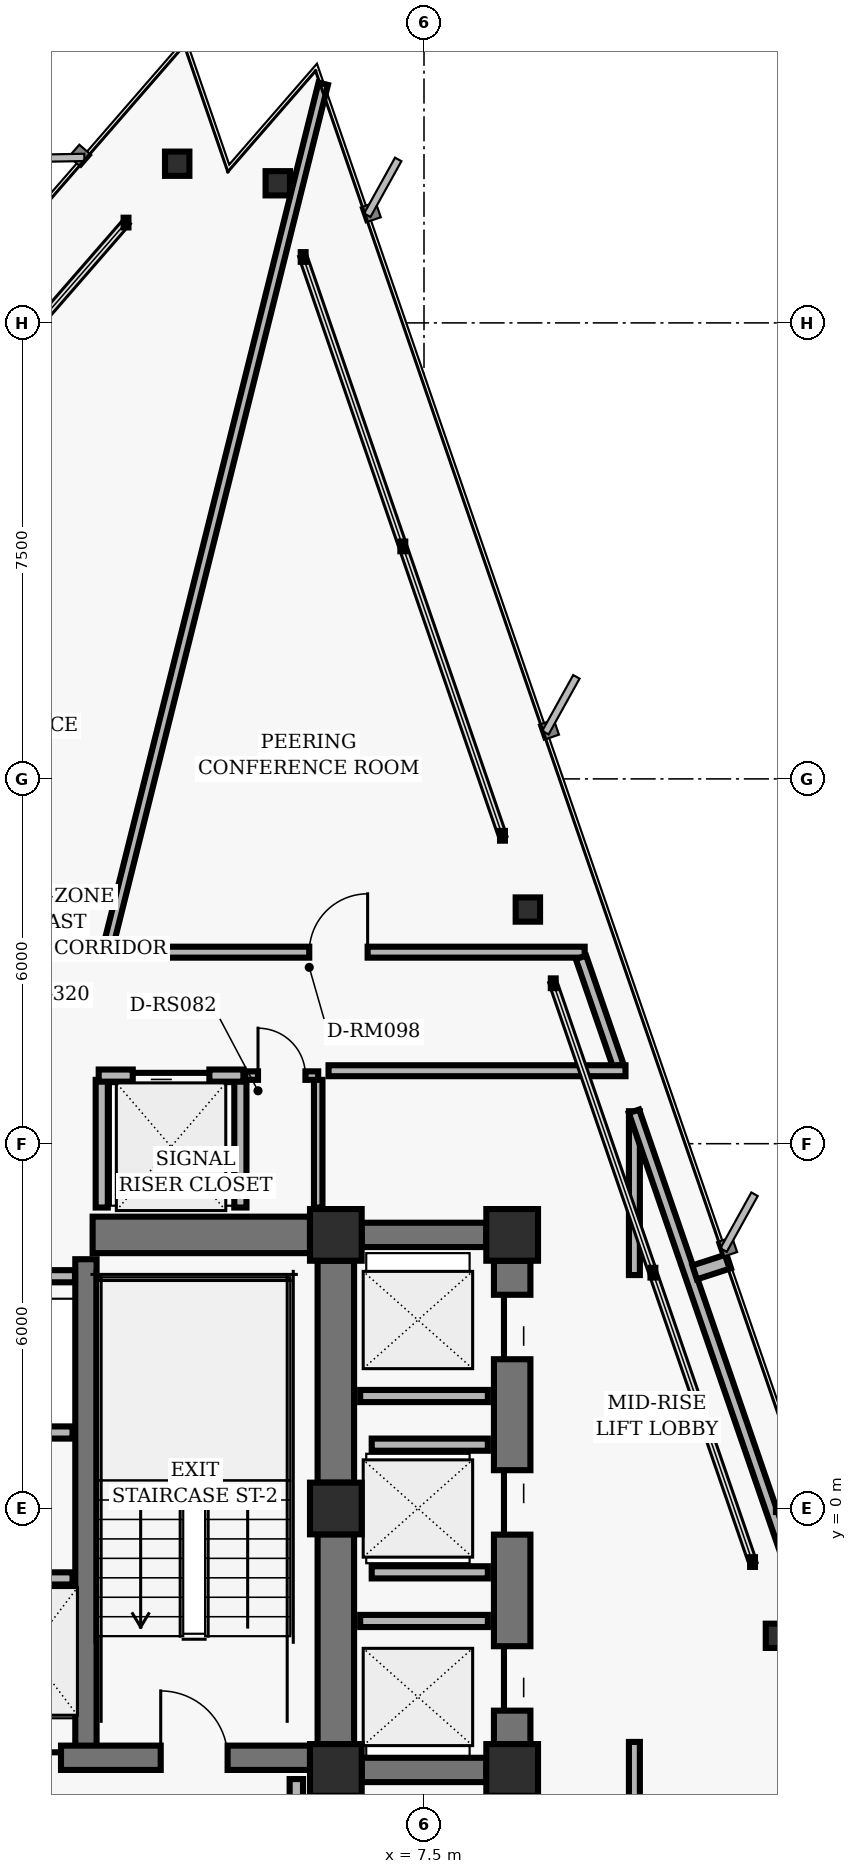
"""IFC4 building model, lengths in metres.
Left out: names, types, materials, properties, quantities, classifications, styles, units other than length and angle.
Written with IfcOpenShell. Run it as: python <this file> out.ifc"""

import sys

from ifc_helpers import new_model, si_unit, direction, frame, frame_2d, origin, origin_2d, place, context, subcontext, project, spatial, rectangle, hollow_rectangle, i_section, extrude, element, fill, save


model = new_model("IFC4")
c1 = context("Model", 3, precision=1e-05, world=origin(), true_north=direction((0.0, 1.0)))
c2 = subcontext(c1, "Body", "Model", "MODEL_VIEW")
j1 = project(units=[si_unit("LENGTHUNIT", "METRE"), si_unit("PLANEANGLEUNIT", "RADIAN")], contexts=[c1])
p1 = place(None, origin())
s1 = spatial("IfcSite", under=j1, at=p1, CompositionType="ELEMENT")
p2 = place(p1, origin())
s2 = spatial("IfcBuilding", under=s1, at=p2, CompositionType="ELEMENT")
p3 = place(p2, frame((0.0, 0.0, 147.2)))
s3 = spatial("IfcBuildingStorey", under=s2, at=p3, CompositionType="ELEMENT", Elevation=147.2)
for number, where, z_axis, x_axis in (
    (1, (6.05, 4.5, 0.0), (0.0, 0.0, 1.0), (1.0, 0.0, 0.0)),
    (2, (6.05, 0.0, 0.0), (0.0, 0.0, 1.0), (1.0, 0.0, 0.0)),
    (3, (6.05, -4.3, 0.0), (0.0, 0.0, 1.0), (1.0, 0.0, 0.0)),
    (4, (8.95, 4.5, 0.0), (0.0, 0.0, 1.0), (1.0, 0.0, 0.0)),
    (5, (8.95, -4.3, 0.0), (0.0, 0.0, 1.0), (1.0, 0.0, 0.0)),
):
    element("IfcColumn", number, at=place(p3, frame(where, z_axis=z_axis, x_axis=x_axis)), inside=s3, PredefinedType="COLUMN", context=c2, shape_type="SweptSolid", body=[
        extrude(hollow_rectangle(XDim=0.85, YDim=0.85, WallThickness=0.055, InnerFilletRadius=0.02, OuterFilletRadius=0.04, at=origin_2d()), origin(), (0.0, 0.0, 1.0), 3.04),
    ])
p4 = place(p3, frame((6.05, 0.425, 0.0), z_axis=(0.0, 0.0, 1.0), x_axis=(0.0, 1.0, 0.0)))
e6 = element("IfcWall", 6, at=p4, inside=s3, PredefinedType="SHEAR", context=c2, shape_type="SweptSolid", body=[
    extrude(rectangle(XDim=3.65, YDim=0.6, at=frame_2d((1.825, 0.0))), origin(), (0.0, 0.0, 1.0), 2.788),
])
p5 = place(p3, frame((6.05, -3.875, 0.0), z_axis=(0.0, 0.0, 1.0), x_axis=(0.0, 1.0, 0.0)))
e7 = element("IfcWall", 7, at=p5, inside=s3, PredefinedType="SHEAR", context=c2, shape_type="SweptSolid", body=[
    extrude(rectangle(XDim=3.45, YDim=0.6, at=frame_2d((1.725, 0.0))), origin(), (0.0, 0.0, 1.0), 2.788),
])
p6 = place(p3, frame((1.94, -4.1, 0.0), z_axis=(0.0, 0.0, 1.0), x_axis=(0.0, 1.0, 0.0)))
e8 = element("IfcWall", 8, at=p6, inside=s3, PredefinedType="SHEAR", context=c2, shape_type="SweptSolid", body=[
    extrude(rectangle(XDim=8.2, YDim=0.35, at=frame_2d((4.1, 0.0))), origin(), (0.0, 0.0, 1.0), 2.788),
])
p7 = place(p3, frame((-5.625, -4.1, 0.0), z_axis=(0.0, 0.0, 1.0), x_axis=(1.0, 0.0, 0.0)))
e9 = element("IfcWall", 9, at=p7, inside=s3, PredefinedType="SHEAR", context=c2, shape_type="SweptSolid", body=[
    extrude(rectangle(XDim=11.25, YDim=0.4, at=frame_2d((5.625, 0.0))), origin(), (0.0, 0.0, 1.0), 2.788),
])
p8 = place(p7, frame((1.355, 0.0, 0.0)))
e10 = element("IfcOpeningElement", 10, at=p8, cuts=e9, PredefinedType="OPENING", context=c2, shape_type="SweptSolid", body=[
    extrude(rectangle(XDim=1.1, YDim=2.04, at=frame_2d((0.55, 1.02))), frame((0.0, 0.21, 0.0), z_axis=(0.0, -1.0, 0.0), x_axis=(1.0, 0.0, 0.0)), (0.0, 0.0, 1.0), 0.42),
])
p9 = place(p7, frame((8.795, 0.0, 0.0)))
e11 = element("IfcOpeningElement", 11, at=p9, cuts=e9, PredefinedType="OPENING", context=c2, shape_type="SweptSolid", body=[
    extrude(rectangle(XDim=1.1, YDim=2.04, at=frame_2d((0.55, 1.02))), frame((0.0, 0.21, 0.0), z_axis=(0.0, -1.0, 0.0), x_axis=(1.0, 0.0, 0.0)), (0.0, 0.0, 1.0), 0.42),
])
p10 = place(p7, frame((4.095, 0.0, 0.0)))
e12 = element("IfcOpeningElement", 12, at=p10, cuts=e9, PredefinedType="OPENING", context=c2, shape_type="SweptSolid", body=[
    extrude(rectangle(XDim=1.06, YDim=2.04, at=frame_2d((0.53, 1.02))), frame((0.0, 0.21, 0.0), z_axis=(0.0, -1.0, 0.0), x_axis=(1.0, 0.0, 0.0)), (0.0, 0.0, 1.0), 0.42),
])
p11 = place(p7, frame((6.095, 0.0, 0.0)))
e13 = element("IfcOpeningElement", 13, at=p11, cuts=e9, PredefinedType="OPENING", context=c2, shape_type="SweptSolid", body=[
    extrude(rectangle(XDim=1.06, YDim=2.04, at=frame_2d((0.53, 1.02))), frame((0.0, 0.21, 0.0), z_axis=(0.0, -1.0, 0.0), x_axis=(1.0, 0.0, 0.0)), (0.0, 0.0, 1.0), 0.42),
])
p12 = place(p3, frame((2.05, 4.5, 0.0), z_axis=(0.0, 0.0, 1.0), x_axis=(1.0, 0.0, 0.0)))
e14 = element("IfcWall", 14, at=p12, inside=s3, PredefinedType="SHEAR", context=c2, shape_type="SweptSolid", body=[
    extrude(rectangle(XDim=3.575, YDim=0.6, at=frame_2d((1.788, 0.0))), origin(), (0.0, 0.0, 1.0), 2.788),
])
p13 = place(p3, frame((8.95, -3.875, 0.0), z_axis=(0.0, 0.0, 1.0), x_axis=(0.0, 1.0, 0.0)))
e15 = element("IfcWall", 15, at=p13, inside=s3, PredefinedType="SHEAR", context=c2, shape_type="SweptSolid", body=[
    extrude(rectangle(XDim=7.95, YDim=0.6, at=frame_2d((3.975, 0.0))), origin(), (0.0, 0.0, 1.0), 2.788),
])
p14 = place(p13, frame((0.55, 0.0, 0.0)))
e16 = element("IfcOpeningElement", 16, at=p14, cuts=e15, PredefinedType="OPENING", context=c2, shape_type="SweptSolid", body=[
    extrude(rectangle(XDim=1.06, YDim=2.04, at=frame_2d((0.53, 1.02))), frame((0.0, 0.31, 0.0), z_axis=(0.0, -1.0, 0.0), x_axis=(1.0, 0.0, 0.0)), (0.0, 0.0, 1.0), 0.62),
])
p15 = place(p13, frame((3.445, 0.0, 0.0)))
e17 = element("IfcOpeningElement", 17, at=p15, cuts=e15, PredefinedType="OPENING", context=c2, shape_type="SweptSolid", body=[
    extrude(rectangle(XDim=1.06, YDim=2.04, at=frame_2d((0.53, 1.02))), frame((0.0, 0.31, 0.0), z_axis=(0.0, -1.0, 0.0), x_axis=(1.0, 0.0, 0.0)), (0.0, 0.0, 1.0), 0.62),
])
p16 = place(p13, frame((6.33, 0.0, 0.0)))
e18 = element("IfcOpeningElement", 18, at=p16, cuts=e15, PredefinedType="OPENING", context=c2, shape_type="SweptSolid", body=[
    extrude(rectangle(XDim=1.06, YDim=2.04, at=frame_2d((0.53, 1.02))), frame((0.0, 0.31, 0.0), z_axis=(0.0, -1.0, 0.0), x_axis=(1.0, 0.0, 0.0)), (0.0, 0.0, 1.0), 0.62),
])
for number, where, z_axis, x_axis in (
    (19, (6.475, 4.5, 0.0), (0.0, 0.0, 1.0), (1.0, 0.0, 0.0)),
    (20, (6.475, -4.3, 0.0), (0.0, 0.0, 1.0), (1.0, 0.0, 0.0)),
):
    element("IfcWall", number, at=place(p3, frame(where, z_axis=z_axis, x_axis=x_axis)), inside=s3, PredefinedType="SHEAR", context=c2, shape_type="SweptSolid", body=[
        extrude(rectangle(XDim=2.05, YDim=0.4, at=frame_2d((1.025, 0.0))), origin(), (0.0, 0.0, 1.0), 2.788),
    ])
for number, where, z_axis, x_axis in (
    (21, (13.321, -2.094, 0.0), (0.0, 0.0, 1.0), (1.0, 0.0, 0.0)),
    (22, (9.208, 9.851, 0.0), (0.0, 0.0, 1.0), (1.0, 0.0, 0.0)),
    (23, (5.095, 21.796, 0.0), (0.0, 0.0, 1.0), (1.0, 0.0, 0.0)),
    (24, (3.441, 22.118, 0.0), (0.0, 0.0, 1.0), (1.0, 0.0, 0.0)),
):
    element("IfcColumn", number, at=place(p3, frame(where, z_axis=z_axis, x_axis=x_axis)), inside=s3, PredefinedType="COLUMN", context=c2, shape_type="SweptSolid", body=[
        extrude(i_section(OverallWidth=0.401, OverallDepth=0.399, WebThickness=0.025, FlangeThickness=0.04, FilletRadius=0.018, at=origin_2d()), origin(), (0.0, 0.0, 1.0), 3.04),
    ])
p17 = place(p3, frame((-1.72, -1.15, 0.0), z_axis=(0.0, 0.0, 1.0), x_axis=(1.0, 0.0, 0.0)))
e25 = element("IfcWall", 25, at=p17, inside=s3, PredefinedType="PARTITIONING", context=c2, shape_type="SweptSolid", body=[
    extrude(rectangle(XDim=3.44, YDim=0.2, at=frame_2d((1.72, 0.0))), origin(), (0.0, 0.0, 1.0), 2.763),
])
p18 = place(p3, frame((5.4, -7.16, 0.0), z_axis=(0.0, 0.0, 1.0), x_axis=(0.0, 1.0, 0.0)))
e26 = element("IfcWall", 26, at=p18, inside=s3, PredefinedType="PARTITIONING", context=c2, shape_type="SweptSolid", body=[
    extrude(rectangle(XDim=2.71, YDim=0.22, at=frame_2d((1.355, 0.0))), origin(), (0.0, 0.0, 1.0), 2.763),
])
p19 = place(p3, frame((-1.72, 1.25, 0.0), z_axis=(0.0, 0.0, 1.0), x_axis=(1.0, 0.0, 0.0)))
e27 = element("IfcWall", 27, at=p19, inside=s3, PredefinedType="PARTITIONING", context=c2, shape_type="SweptSolid", body=[
    extrude(rectangle(XDim=3.44, YDim=0.2, at=frame_2d((1.72, 0.0))), origin(), (0.0, 0.0, 1.0), 2.763),
])
p20 = place(p3, frame((-1.76, 3.82, 0.0), z_axis=(0.0, 0.0, 1.0), x_axis=(1.0, 0.0, 0.0)))
e28 = element("IfcWall", 28, at=p20, inside=s3, PredefinedType="PARTITIONING", context=c2, shape_type="SweptSolid", body=[
    extrude(rectangle(XDim=3.52, YDim=0.2, at=frame_2d((1.76, 0.0))), origin(), (0.0, 0.0, 1.0), 2.763),
])
for number, where, z_axis, x_axis in (
    (29, (2.2, 4.95, 0.0), (0.0, 0.0, 1.0), (0.0, 1.0, 0.0)),
    (30, (4.48, 4.95, 0.0), (0.0, 0.0, 1.0), (0.0, 1.0, 0.0)),
):
    element("IfcWall", number, at=place(p3, frame(where, z_axis=z_axis, x_axis=x_axis)), inside=s3, PredefinedType="PARTITIONING", context=c2, shape_type="SweptSolid", body=[
        extrude(rectangle(XDim=2.1, YDim=0.2, at=frame_2d((1.05, 0.0))), origin(), (0.0, 0.0, 1.0), 2.763),
    ])
p21 = place(p3, frame((2.15, 7.12, 0.0), z_axis=(0.0, 0.0, 1.0), x_axis=(1.0, 0.0, 0.0)))
e31 = element("IfcWall", 31, at=p21, inside=s3, PredefinedType="PARTITIONING", context=c2, shape_type="SweptSolid", body=[
    extrude(rectangle(XDim=2.38, YDim=0.2, at=frame_2d((1.19, 0.0))), origin(), (0.0, 0.0, 1.0), 2.763),
])
p22 = place(p21, frame((0.56, 0.0, 0.0)))
e32 = element("IfcOpeningElement", 32, at=p22, cuts=e31, PredefinedType="OPENING", context=c2, shape_type="SweptSolid", body=[
    extrude(rectangle(XDim=1.26, YDim=2.06, at=frame_2d((0.63, 1.03))), frame((0.0, 0.11, 0.0), z_axis=(0.0, -1.0, 0.0), x_axis=(1.0, 0.0, 0.0)), (0.0, 0.0, 1.0), 0.22),
])
p23 = place(p3, frame((5.76, 4.95, 0.0), z_axis=(0.0, 0.0, 1.0), x_axis=(0.0, 1.0, 0.0)))
e33 = element("IfcWall", 33, at=p23, inside=s3, PredefinedType="PARTITIONING", context=c2, shape_type="SweptSolid", body=[
    extrude(rectangle(XDim=2.1, YDim=0.14, at=frame_2d((1.05, 0.0))), origin(), (0.0, 0.0, 1.0), 2.763),
])
p24 = place(p3, frame((4.56, 7.12, 0.0), z_axis=(0.0, 0.0, 1.0), x_axis=(1.0, 0.0, 0.0)))
e34 = element("IfcWall", 34, at=p24, inside=s3, PredefinedType="PARTITIONING", context=c2, shape_type="SweptSolid", body=[
    extrude(rectangle(XDim=1.2, YDim=0.14, at=frame_2d((0.6, 0.0))), origin(), (0.0, 0.0, 1.0), 2.763),
])
p25 = place(p24, frame((0.21, 0.0, 0.0)))
e35 = element("IfcOpeningElement", 35, at=p25, cuts=e34, PredefinedType="OPENING", context=c2, shape_type="SweptSolid", body=[
    extrude(rectangle(XDim=0.78, YDim=2.01, at=frame_2d((0.39, 1.005))), frame((0.0, 0.08, 0.0), z_axis=(0.0, -1.0, 0.0), x_axis=(1.0, 0.0, 0.0)), (0.0, 0.0, 1.0), 0.16),
])
for number, where, z_axis, x_axis in (
    (36, (6.45, -1.85, 0.0), (0.0, 0.0, 1.0), (1.0, 0.0, 0.0)),
    (37, (6.45, 1.85, 0.0), (0.0, 0.0, 1.0), (1.0, 0.0, 0.0)),
):
    element("IfcWall", number, at=place(p3, frame(where, z_axis=z_axis, x_axis=x_axis)), inside=s3, PredefinedType="PARTITIONING", context=c2, shape_type="SweptSolid", body=[
        extrude(rectangle(XDim=2.1, YDim=0.2, at=frame_2d((1.05, 0.0))), origin(), (0.0, 0.0, 1.0), 2.763),
    ])
for number, where, z_axis, x_axis in (
    (38, (6.64, -1.05, 0.0), (0.0, 0.0, 1.0), (1.0, 0.0, 0.0)),
    (39, (6.64, 1.05, 0.0), (0.0, 0.0, 1.0), (1.0, 0.0, 0.0)),
):
    element("IfcWall", number, at=place(p3, frame(where, z_axis=z_axis, x_axis=x_axis)), inside=s3, PredefinedType="PARTITIONING", context=c2, shape_type="SweptSolid", body=[
        extrude(rectangle(XDim=1.91, YDim=0.2, at=frame_2d((0.955, 0.0))), origin(), (0.0, 0.0, 1.0), 2.763),
    ])
p26 = place(p3, frame((-6.52, 9.15, 0.0), z_axis=(0.0, 0.0, 1.0), x_axis=(1.0, 0.0, 0.0)))
e40 = element("IfcWall", 40, at=p26, inside=s3, PredefinedType="PARTITIONING", context=c2, shape_type="SweptSolid", body=[
    extrude(rectangle(XDim=16.662, YDim=0.18, at=frame_2d((8.331, 0.0))), origin(), (0.0, 0.0, 1.0), 2.763),
])
p27 = place(p26, frame((12.133, 0.0, 0.0)))
e41 = element("IfcOpeningElement", 41, at=p27, cuts=e40, PredefinedType="OPENING", context=c2, shape_type="SweptSolid", body=[
    extrude(rectangle(XDim=0.96, YDim=2.02, at=frame_2d((0.48, 1.01))), frame((0.0, 0.1, 0.0), z_axis=(0.0, -1.0, 0.0), x_axis=(1.0, 0.0, 0.0)), (0.0, 0.0, 1.0), 0.2),
])
p28 = place(p26, frame((4.06, 0.0, 0.0)))
e42 = element("IfcOpeningElement", 42, at=p28, cuts=e40, PredefinedType="OPENING", context=c2, shape_type="SweptSolid", body=[
    extrude(rectangle(XDim=0.96, YDim=2.02, at=frame_2d((0.48, 1.01))), frame((0.0, 0.1, 0.0), z_axis=(0.0, -1.0, 0.0), x_axis=(1.0, 0.0, 0.0)), (0.0, 0.0, 1.0), 0.2),
])
p29 = place(p3, frame((10.082, 9.065, 0.0), z_axis=(0.0, 0.0, 1.0), x_axis=(0.325550958337, -0.945524496524, 0.0)))
e43 = element("IfcWall", 43, at=p29, inside=s3, PredefinedType="PARTITIONING", context=c2, shape_type="SweptSolid", body=[
    extrude(rectangle(XDim=1.882, YDim=0.18, at=frame_2d((0.941, 0.0))), origin(), (0.0, 0.0, 1.0), 2.763),
])
p30 = place(p3, frame((10.814, 7.2, 0.0), z_axis=(0.0, 0.0, 1.0), x_axis=(-1.0, 0.0, 0.0)))
e44 = element("IfcWall", 44, at=p30, inside=s3, PredefinedType="PARTITIONING", context=c2, shape_type="SweptSolid", body=[
    extrude(rectangle(XDim=4.884, YDim=0.18, at=frame_2d((2.442, 0.0))), origin(), (0.0, 0.0, 1.0), 2.763),
])
p31 = place(p3, frame((10.96, -7.11, 0.0), z_axis=(0.0, 0.0, 1.0), x_axis=(0.0, 1.0, 0.0)))
e45 = element("IfcWall", 45, at=p31, inside=s3, PredefinedType="PARTITIONING", context=c2, shape_type="SweptSolid", body=[
    extrude(rectangle(XDim=3.271, YDim=0.18, at=frame_2d((1.635, 0.0))), origin(), (0.0, 0.0, 1.0), 2.763),
])
p32 = place(p3, frame((10.96, 3.84, 0.0), z_axis=(0.0, 0.0, 1.0), x_axis=(0.0, 1.0, 0.0)))
e46 = element("IfcWall", 46, at=p32, inside=s3, PredefinedType="PARTITIONING", context=c2, shape_type="SweptSolid", body=[
    extrude(rectangle(XDim=2.694, YDim=0.18, at=frame_2d((1.347, 0.0))), origin(), (0.0, 0.0, 1.0), 2.33),
])
p33 = place(p3, frame((10.954, 6.533, 0.0), z_axis=(0.0, 0.0, 1.0), x_axis=(0.325553439946, -0.945523642084, 0.0)))
e47 = element("IfcWall", 47, at=p33, inside=s3, PredefinedType="PARTITIONING", context=c2, shape_type="SweptSolid", body=[
    extrude(rectangle(XDim=11.22, YDim=0.18, at=frame_2d((5.61, 0.0))), origin(), (0.0, 0.0, 1.0), 2.763),
])
p34 = place(p3, frame((13.288, 0.0, 0.0), z_axis=(0.0, 0.0, 1.0), x_axis=(1.0, 0.0, 0.0)))
e48 = element("IfcWall", 48, at=p34, inside=s3, PredefinedType="MOVABLE", context=c2, shape_type="SweptSolid", body=[
    extrude(rectangle(XDim=0.624, YDim=0.115, at=frame_2d((0.312, 0.0))), origin(), (0.0, 0.0, 1.0), 2.763),
])
p35 = place(p3, frame((11.95, 3.883, 0.0), z_axis=(0.0, 0.0, 1.0), x_axis=(0.951055346906, 0.309020593362, 0.0)))
e49 = element("IfcWall", 49, at=p35, inside=s3, PredefinedType="PARTITIONING", context=c2, shape_type="SweptSolid", body=[
    extrude(rectangle(XDim=0.59, YDim=0.24, at=frame_2d((0.295, 0.0))), origin(), (0.0, 0.0, 1.0), 2.763),
])
p36 = place(p3, frame((2.301, 9.23, 0.0), z_axis=(0.0, 0.0, 1.0), x_axis=(0.241931245301, 0.970293395086, 0.0)))
e50 = element("IfcWall", 50, at=p36, inside=s3, PredefinedType="PARTITIONING", context=c2, shape_type="SweptSolid", body=[
    extrude(rectangle(XDim=14.638, YDim=0.16, at=frame_2d((7.319, 0.0))), origin(), (0.0, 0.0, 1.0), 2.763),
])
p37 = place(p9, origin())
e51 = element("IfcDoor", 51, at=p37, inside=s3, OperationType="SINGLE_SWING_LEFT", PredefinedType="DOOR", context=c2, shape_type="SweptSolid", body=[
    extrude(rectangle(XDim=1.1, YDim=2.04, at=frame_2d((0.55, 1.02))), frame((0.0, 0.025, 0.0), z_axis=(0.0, -1.0, 0.0), x_axis=(1.0, 0.0, 0.0)), (0.0, 0.0, 1.0), 0.05),
])
fill(e11, e51)
p38 = place(p11, origin())
e52 = element("IfcDoor", 52, at=p38, inside=s3, OperationType="SLIDING_TO_RIGHT", PredefinedType="DOOR", context=c2, shape_type="SweptSolid", body=[
    extrude(rectangle(XDim=1.06, YDim=2.04, at=frame_2d((0.53, 1.02))), frame((0.0, 0.025, 0.0), z_axis=(0.0, -1.0, 0.0), x_axis=(1.0, 0.0, 0.0)), (0.0, 0.0, 1.0), 0.05),
])
fill(e13, e52)
p39 = place(p22, origin())
e53 = element("IfcDoor", 53, at=p39, inside=s3, OperationType="SLIDING_TO_LEFT", PredefinedType="DOOR", context=c2, shape_type="SweptSolid", body=[
    extrude(rectangle(XDim=1.26, YDim=2.06, at=frame_2d((0.63, 1.03))), frame((0.0, 0.025, 0.0), z_axis=(0.0, -1.0, 0.0), x_axis=(1.0, 0.0, 0.0)), (0.0, 0.0, 1.0), 0.05),
])
fill(e32, e53)
p40 = place(p25, origin())
e54 = element("IfcDoor", 54, at=p40, inside=s3, OperationType="SINGLE_SWING_LEFT", PredefinedType="DOOR", context=c2, shape_type="SweptSolid", body=[
    extrude(rectangle(XDim=0.78, YDim=2.01, at=frame_2d((0.39, 1.005))), frame((0.0, 0.025, 0.0), z_axis=(0.0, -1.0, 0.0), x_axis=(1.0, 0.0, 0.0)), (0.0, 0.0, 1.0), 0.05),
])
fill(e35, e54)
p41 = place(p14, origin())
e55 = element("IfcDoor", 55, at=p41, inside=s3, OperationType="SLIDING_TO_LEFT", PredefinedType="DOOR", context=c2, shape_type="SweptSolid", body=[
    extrude(rectangle(XDim=1.06, YDim=2.04, at=frame_2d((0.53, 1.02))), frame((0.0, 0.025, 0.0), z_axis=(0.0, -1.0, 0.0), x_axis=(1.0, 0.0, 0.0)), (0.0, 0.0, 1.0), 0.05),
])
fill(e16, e55)
p42 = place(p15, origin())
e56 = element("IfcDoor", 56, at=p42, inside=s3, OperationType="SLIDING_TO_RIGHT", PredefinedType="DOOR", context=c2, shape_type="SweptSolid", body=[
    extrude(rectangle(XDim=1.06, YDim=2.04, at=frame_2d((0.53, 1.02))), frame((0.0, 0.025, 0.0), z_axis=(0.0, -1.0, 0.0), x_axis=(1.0, 0.0, 0.0)), (0.0, 0.0, 1.0), 0.05),
])
fill(e17, e56)
p43 = place(p16, origin())
e57 = element("IfcDoor", 57, at=p43, inside=s3, OperationType="SLIDING_TO_LEFT", PredefinedType="DOOR", context=c2, shape_type="SweptSolid", body=[
    extrude(rectangle(XDim=1.06, YDim=2.04, at=frame_2d((0.53, 1.02))), frame((0.0, 0.025, 0.0), z_axis=(0.0, -1.0, 0.0), x_axis=(1.0, 0.0, 0.0)), (0.0, 0.0, 1.0), 0.05),
])
fill(e18, e57)
p44 = place(p27, origin())
e58 = element("IfcDoor", 58, at=p44, inside=s3, OperationType="SINGLE_SWING_RIGHT", PredefinedType="DOOR", context=c2, shape_type="SweptSolid", body=[
    extrude(rectangle(XDim=0.96, YDim=2.02, at=frame_2d((0.48, 1.01))), frame((0.0, 0.025, 0.0), z_axis=(0.0, -1.0, 0.0), x_axis=(1.0, 0.0, 0.0)), (0.0, 0.0, 1.0), 0.05),
])
fill(e41, e58)
save(model, sys.argv[1])
